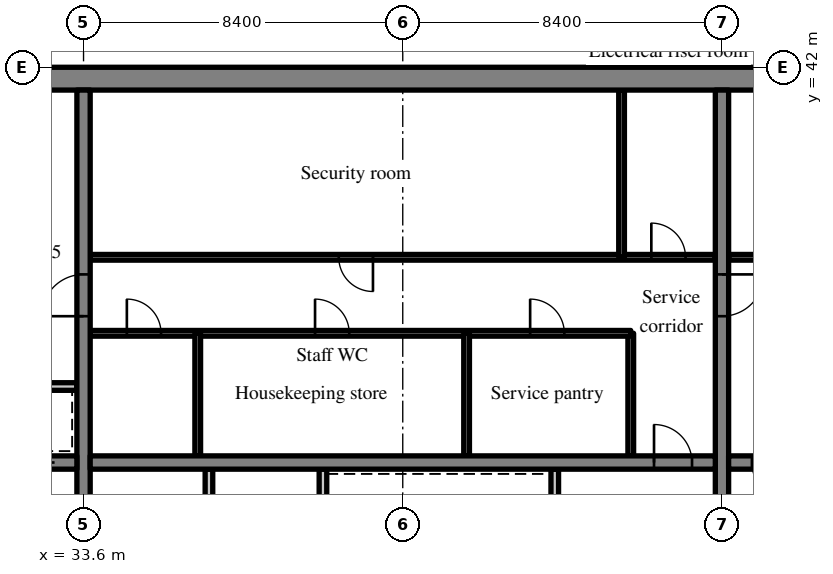
"""IFC4 building model, lengths in metres.
Left out: names, types, materials, properties, quantities, classifications, styles, units other than length and angle.
Written with IfcOpenShell. Run it as: python <this file> out.ifc"""

import sys

from ifc_helpers import new_model, si_unit, direction, frame, frame_2d, origin, place, context, subcontext, project, spatial, rectangle, extrude, source, transform, mapped, element, fill, save


model = new_model("IFC4")
c1 = context("Model", 3, precision=1e-05, world=origin(), true_north=direction((0.0, 1.0)))
c2 = subcontext(c1, "Body", "Model", "MODEL_VIEW")
j1 = project(units=[si_unit("LENGTHUNIT", "METRE"), si_unit("PLANEANGLEUNIT", "RADIAN")], contexts=[c1])
p1 = place(None, origin())
s1 = spatial("IfcSite", under=j1, at=p1, CompositionType="ELEMENT")
p2 = place(p1, origin())
s2 = spatial("IfcBuilding", under=s1, at=p2, CompositionType="ELEMENT")
p3 = place(p2, frame((0.0, 0.0, 241.3)))
s3 = spatial("IfcBuildingStorey", under=s2, at=p3, CompositionType="ELEMENT", Elevation=241.3)
m1 = source(origin(), c2, "Body", "SweptSolid", [
    extrude(rectangle(XDim=50.4, YDim=0.6, at=frame_2d((25.2, 0.0))), origin(), (0.0, 0.0, 1.0), 3.62),
])
p4 = place(p3, frame((25.2, 41.7, 0.0), z_axis=(0.0, 0.0, 1.0), x_axis=(1.0, 0.0, 0.0)))
e1 = element("IfcWall", 1, at=p4, inside=s3, PredefinedType="SHEAR", context=c2, shape_type="MappedRepresentation", body=[
    mapped(m1, transform((0.0, 0.0, 0.0), scale=1.0)),
])
m2 = source(origin(), c2, "Body", "SweptSolid", [
    extrude(rectangle(XDim=18.8, YDim=0.35, at=frame_2d((9.4, 0.0))), origin(), (0.0, 0.0, 1.0), 3.62),
])
p5 = place(p3, frame((33.6, 22.6, 0.0), z_axis=(0.0, 0.0, 1.0), x_axis=(0.0, 1.0, 0.0)))
e2 = element("IfcWall", 2, at=p5, inside=s3, PredefinedType="SHEAR", context=c2, shape_type="MappedRepresentation", body=[
    mapped(m2, transform((0.0, 0.0, 0.0), scale=1.0)),
])
m3 = source(origin(), c2, "Body", "SweptSolid", [
    extrude(rectangle(XDim=1.1, YDim=2.1, at=frame_2d((0.55, 1.05))), frame((0.0, 0.185, 0.0), z_axis=(0.0, -1.0, 0.0), x_axis=(1.0, 0.0, 0.0)), (0.0, 0.0, 1.0), 0.37),
])
p6 = place(p5, frame((12.85, 0.0, 0.0)))
e3 = element("IfcOpeningElement", 3, at=p6, cuts=e2, PredefinedType="OPENING", context=c2, shape_type="MappedRepresentation", body=[
    mapped(m3, transform((0.0, 0.0, 0.0), scale=1.0)),
])
p7 = place(p3, frame((50.4, 22.6, 0.0), z_axis=(0.0, 0.0, 1.0), x_axis=(0.0, 1.0, 0.0)))
e4 = element("IfcWall", 4, at=p7, inside=s3, PredefinedType="SHEAR", context=c2, shape_type="MappedRepresentation", body=[
    mapped(m2, transform((0.0, 0.0, 0.0), scale=1.0)),
])
p8 = place(p7, frame((12.85, 0.0, 0.0)))
e5 = element("IfcOpeningElement", 5, at=p8, cuts=e4, PredefinedType="OPENING", context=c2, shape_type="MappedRepresentation", body=[
    mapped(m3, transform((0.0, 0.0, 0.0), scale=1.0)),
])
m4 = source(origin(), c2, "Body", "SweptSolid", [
    extrude(rectangle(XDim=7.625, YDim=0.35, at=frame_2d((3.812, 0.0))), origin(), (0.0, 0.0, 1.0), 3.62),
])
p9 = place(p3, frame((25.8, 31.6, 0.0), z_axis=(0.0, 0.0, 1.0), x_axis=(1.0, 0.0, 0.0)))
e6 = element("IfcWall", 6, at=p9, inside=s3, PredefinedType="SHEAR", context=c2, shape_type="MappedRepresentation", body=[
    mapped(m4, transform((0.0, 0.0, 0.0), scale=1.0)),
])
p10 = place(p9, frame((5.938, 0.0, 0.0)))
e7 = element("IfcOpeningElement", 7, at=p10, cuts=e6, PredefinedType="OPENING", context=c2, shape_type="MappedRepresentation", body=[
    mapped(m3, transform((0.0, 0.0, 0.0), scale=1.0)),
])
m5 = source(origin(), c2, "Body", "SweptSolid", [
    extrude(rectangle(XDim=16.45, YDim=0.35, at=frame_2d((8.225, 0.0))), origin(), (0.0, 0.0, 1.0), 3.62),
])
p11 = place(p3, frame((33.775, 31.6, 0.0), z_axis=(0.0, 0.0, 1.0), x_axis=(1.0, 0.0, 0.0)))
e8 = element("IfcWall", 8, at=p11, inside=s3, PredefinedType="SHEAR", context=c2, shape_type="MappedRepresentation", body=[
    mapped(m5, transform((0.0, 0.0, 0.0), scale=1.0)),
])
m6 = source(origin(), c2, "Body", "SweptSolid", [
    extrude(rectangle(XDim=1.0, YDim=2.1, at=frame_2d((0.5, 1.05))), frame((0.0, 0.185, 0.0), z_axis=(0.0, -1.0, 0.0), x_axis=(1.0, 0.0, 0.0)), (0.0, 0.0, 1.0), 0.37),
])
p12 = place(p11, frame((14.837, 0.0, 0.0)))
e9 = element("IfcOpeningElement", 9, at=p12, cuts=e8, PredefinedType="OPENING", context=c2, shape_type="MappedRepresentation", body=[
    mapped(m6, transform((0.0, 0.0, 0.0), scale=1.0)),
])
m7 = source(origin(), c2, "Body", "SweptSolid", [
    extrude(rectangle(XDim=16.45, YDim=0.35, at=frame_2d((8.225, 0.0))), origin(), (0.0, 0.0, 1.0), 3.62),
])
p13 = place(p3, frame((50.575, 31.6, 0.0), z_axis=(0.0, 0.0, 1.0), x_axis=(1.0, 0.0, 0.0)))
e10 = element("IfcWall", 10, at=p13, inside=s3, PredefinedType="SHEAR", context=c2, shape_type="MappedRepresentation", body=[
    mapped(m7, transform((0.0, 0.0, 0.0), scale=1.0)),
])
p14 = place(p13, frame((0.613, 0.0, 0.0)))
e11 = element("IfcOpeningElement", 11, at=p14, cuts=e10, PredefinedType="OPENING", context=c2, shape_type="MappedRepresentation", body=[
    mapped(m6, transform((0.0, 0.0, 0.0), scale=1.0)),
])
m8 = source(origin(), c2, "Body", "SweptSolid", [
    extrude(rectangle(XDim=8.825, YDim=0.2, at=frame_2d((4.413, 0.0))), origin(), (0.0, 0.0, 1.0), 3.62),
])
p15 = place(p3, frame((39.9, 22.6, 0.0), z_axis=(0.0, 0.0, 1.0), x_axis=(0.0, 1.0, 0.0)))
e12 = element("IfcWall", 12, at=p15, inside=s3, PredefinedType="PARTITIONING", context=c2, shape_type="MappedRepresentation", body=[
    mapped(m8, transform((0.0, 0.0, 0.0), scale=1.0)),
])
m9 = source(origin(), c2, "Body", "SweptSolid", [
    extrude(rectangle(XDim=0.9, YDim=2.1, at=frame_2d((0.45, 1.05))), frame((0.0, 0.11, 0.0), z_axis=(0.0, -1.0, 0.0), x_axis=(1.0, 0.0, 0.0)), (0.0, 0.0, 1.0), 0.22),
])
p16 = place(p15, frame((3.15, 0.0, 0.0)))
e13 = element("IfcOpeningElement", 13, at=p16, cuts=e12, PredefinedType="OPENING", context=c2, shape_type="MappedRepresentation", body=[
    mapped(m9, transform((0.0, 0.0, 0.0), scale=1.0)),
])
p17 = place(p15, frame((4.95, 0.0, 0.0)))
e14 = element("IfcOpeningElement", 14, at=p17, cuts=e12, PredefinedType="OPENING", context=c2, shape_type="MappedRepresentation", body=[
    mapped(m9, transform((0.0, 0.0, 0.0), scale=1.0)),
])
m10 = source(origin(), c2, "Body", "SweptSolid", [
    extrude(rectangle(XDim=2.625, YDim=0.2, at=frame_2d((1.312, 0.0))), origin(), (0.0, 0.0, 1.0), 3.62),
])
p18 = place(p3, frame((46.0, 28.8, 0.0), z_axis=(0.0, 0.0, 1.0), x_axis=(0.0, 1.0, 0.0)))
e15 = element("IfcWall", 15, at=p18, inside=s3, PredefinedType="SOLIDWALL", context=c2, shape_type="MappedRepresentation", body=[
    mapped(m10, transform((0.0, 0.0, 0.0), scale=1.0)),
])
p19 = place(p3, frame((36.9, 22.6, 0.0), z_axis=(0.0, 0.0, 1.0), x_axis=(0.0, 1.0, 0.0)))
e16 = element("IfcWall", 16, at=p19, inside=s3, PredefinedType="PARTITIONING", context=c2, shape_type="MappedRepresentation", body=[
    mapped(m8, transform((0.0, 0.0, 0.0), scale=1.0)),
])
m11 = source(origin(), c2, "Body", "SweptSolid", [
    extrude(rectangle(XDim=3.225, YDim=0.15, at=frame_2d((1.613, 0.0))), origin(), (0.0, 0.0, 1.0), 3.62),
])
p20 = place(p3, frame((48.0, 31.775, 0.0), z_axis=(0.0, 0.0, 1.0), x_axis=(0.0, 1.0, 0.0)))
e17 = element("IfcWall", 17, at=p20, inside=s3, PredefinedType="PARTITIONING", context=c2, shape_type="MappedRepresentation", body=[
    mapped(m11, transform((0.0, 0.0, 0.0), scale=1.0)),
])
m12 = source(origin(), c2, "Body", "SweptSolid", [
    extrude(rectangle(XDim=14.225, YDim=0.15, at=frame_2d((7.113, 0.0))), origin(), (0.0, 0.0, 1.0), 3.62),
])
p21 = place(p3, frame((33.775, 35.0, 0.0), z_axis=(0.0, 0.0, 1.0), x_axis=(1.0, 0.0, 0.0)))
e18 = element("IfcWall", 18, at=p21, inside=s3, PredefinedType="PARTITIONING", context=c2, shape_type="MappedRepresentation", body=[
    mapped(m12, transform((0.0, 0.0, 0.0), scale=1.0)),
])
m13 = source(origin(), c2, "Body", "SweptSolid", [
    extrude(rectangle(XDim=0.9, YDim=2.1, at=frame_2d((0.45, 1.05))), frame((0.0, 0.085, 0.0), z_axis=(0.0, -1.0, 0.0), x_axis=(1.0, 0.0, 0.0)), (0.0, 0.0, 1.0), 0.17),
])
p22 = place(p21, frame((0.965, 0.0, 0.0)))
e19 = element("IfcOpeningElement", 19, at=p22, cuts=e18, PredefinedType="OPENING", context=c2, shape_type="MappedRepresentation", body=[
    mapped(m13, transform((0.0, 0.0, 0.0), scale=1.0)),
])
p23 = place(p21, frame((5.917, 0.0, 0.0)))
e20 = element("IfcOpeningElement", 20, at=p23, cuts=e18, PredefinedType="OPENING", context=c2, shape_type="MappedRepresentation", body=[
    mapped(m13, transform((0.0, 0.0, 0.0), scale=1.0)),
])
p24 = place(p21, frame((11.577, 0.0, 0.0)))
e21 = element("IfcOpeningElement", 21, at=p24, cuts=e18, PredefinedType="OPENING", context=c2, shape_type="MappedRepresentation", body=[
    mapped(m13, transform((0.0, 0.0, 0.0), scale=1.0)),
])
m14 = source(origin(), c2, "Body", "SweptSolid", [
    extrude(rectangle(XDim=16.45, YDim=0.15, at=frame_2d((8.225, 0.0))), origin(), (0.0, 0.0, 1.0), 3.62),
])
p25 = place(p3, frame((33.775, 37.0, 0.0), z_axis=(0.0, 0.0, 1.0), x_axis=(1.0, 0.0, 0.0)))
e22 = element("IfcWall", 22, at=p25, inside=s3, PredefinedType="PARTITIONING", context=c2, shape_type="MappedRepresentation", body=[
    mapped(m14, transform((0.0, 0.0, 0.0), scale=1.0)),
])
p26 = place(p25, frame((6.541, 0.0, 0.0)))
e23 = element("IfcOpeningElement", 23, at=p26, cuts=e22, PredefinedType="OPENING", context=c2, shape_type="MappedRepresentation", body=[
    mapped(m13, transform((0.0, 0.0, 0.0), scale=1.0)),
])
p27 = place(p25, frame((14.766, 0.0, 0.0)))
e24 = element("IfcOpeningElement", 24, at=p27, cuts=e22, PredefinedType="OPENING", context=c2, shape_type="MappedRepresentation", body=[
    mapped(m13, transform((0.0, 0.0, 0.0), scale=1.0)),
])
for number, where, z_axis, x_axis in (
    (25, (36.605, 31.775, 0.0), (0.0, 0.0, 1.0), (0.0, 1.0, 0.0)),
    (26, (43.68, 31.775, 0.0), (0.0, 0.0, 1.0), (0.0, 1.0, 0.0)),
):
    element("IfcWall", number, at=place(p3, frame(where, z_axis=z_axis, x_axis=x_axis)), inside=s3, PredefinedType="PARTITIONING", context=c2, shape_type="MappedRepresentation", body=[
        mapped(m11, transform((0.0, 0.0, 0.0), scale=1.0)),
    ])
m15 = source(origin(), c2, "Body", "SweptSolid", [
    extrude(rectangle(XDim=4.4, YDim=0.15, at=frame_2d((2.2, 0.0))), origin(), (0.0, 0.0, 1.0), 3.62),
])
p28 = place(p3, frame((47.758, 37.0, 0.0), z_axis=(0.0, 0.0, 1.0), x_axis=(0.0, 1.0, 0.0)))
e27 = element("IfcWall", 27, at=p28, inside=s3, PredefinedType="PARTITIONING", context=c2, shape_type="MappedRepresentation", body=[
    mapped(m15, transform((0.0, 0.0, 0.0), scale=1.0)),
])
m16 = source(origin(), c2, "Body", "SweptSolid", [
    extrude(rectangle(XDim=16.45, YDim=0.15, at=frame_2d((8.225, 0.0))), origin(), (0.0, 0.0, 1.0), 3.62),
])
p29 = place(p3, frame((67.025, 37.0, 0.0), z_axis=(0.0, 0.0, 1.0), x_axis=(-1.0, 0.0, 0.0)))
e28 = element("IfcWall", 28, at=p29, inside=s3, PredefinedType="PARTITIONING", context=c2, shape_type="MappedRepresentation", body=[
    mapped(m16, transform((0.0, 0.0, 0.0), scale=1.0)),
])
p30 = place(p29, frame((1.606, 0.0, 0.0)))
e29 = element("IfcOpeningElement", 29, at=p30, cuts=e28, PredefinedType="OPENING", context=c2, shape_type="MappedRepresentation", body=[
    mapped(m13, transform((0.0, 0.0, 0.0), scale=1.0)),
])
p31 = place(p29, frame((7.364, 0.0, 0.0)))
e30 = element("IfcOpeningElement", 30, at=p31, cuts=e28, PredefinedType="OPENING", context=c2, shape_type="MappedRepresentation", body=[
    mapped(m13, transform((0.0, 0.0, 0.0), scale=1.0)),
])
p32 = place(p29, frame((12.299, 0.0, 0.0)))
e31 = element("IfcOpeningElement", 31, at=p32, cuts=e28, PredefinedType="OPENING", context=c2, shape_type="MappedRepresentation", body=[
    mapped(m13, transform((0.0, 0.0, 0.0), scale=1.0)),
])
p33 = place(p29, frame((14.766, 0.0, 0.0)))
e32 = element("IfcOpeningElement", 32, at=p33, cuts=e28, PredefinedType="OPENING", context=c2, shape_type="MappedRepresentation", body=[
    mapped(m13, transform((0.0, 0.0, 0.0), scale=1.0)),
])
m17 = source(origin(), c2, "Body", "SweptSolid", [
    extrude(rectangle(XDim=2.275, YDim=0.2, at=frame_2d((1.138, 0.0))), origin(), (0.0, 0.0, 1.0), 3.62),
])
p34 = place(p3, frame((31.15, 33.6, 0.0), z_axis=(0.0, 0.0, 1.0), x_axis=(1.0, 0.0, 0.0)))
e33 = element("IfcWall", 33, at=p34, inside=s3, PredefinedType="SOLIDWALL", context=c2, shape_type="MappedRepresentation", body=[
    mapped(m17, transform((0.0, 0.0, 0.0), scale=1.0)),
])
m18 = source(origin(), c2, "Body", "SweptSolid", [
    extrude(rectangle(XDim=1.0, YDim=2.1, at=frame_2d((0.5, 1.05))), frame((0.0, 0.025, 0.0), z_axis=(0.0, -1.0, 0.0), x_axis=(1.0, 0.0, 0.0)), (0.0, 0.0, 1.0), 0.05),
])
p35 = place(p12, origin())
e34 = element("IfcDoor", 34, at=p35, inside=s3, OperationType="SINGLE_SWING_LEFT", PredefinedType="DOOR", context=c2, shape_type="MappedRepresentation", body=[
    mapped(m18, transform((0.0, 0.0, 0.0), scale=1.0)),
])
fill(e9, e34)
m19 = source(origin(), c2, "Body", "SweptSolid", [
    extrude(rectangle(XDim=0.9, YDim=2.1, at=frame_2d((0.45, 1.05))), frame((0.0, 0.025, 0.0), z_axis=(0.0, -1.0, 0.0), x_axis=(1.0, 0.0, 0.0)), (0.0, 0.0, 1.0), 0.05),
])
p36 = place(p22, origin())
e35 = element("IfcDoor", 35, at=p36, inside=s3, OperationType="SINGLE_SWING_LEFT", PredefinedType="DOOR", context=c2, shape_type="MappedRepresentation", body=[
    mapped(m19, transform((0.0, 0.0, 0.0), scale=1.0)),
])
fill(e19, e35)
p37 = place(p23, origin())
e36 = element("IfcDoor", 36, at=p37, inside=s3, OperationType="SINGLE_SWING_LEFT", PredefinedType="DOOR", context=c2, shape_type="MappedRepresentation", body=[
    mapped(m19, transform((0.0, 0.0, 0.0), scale=1.0)),
])
fill(e20, e36)
p38 = place(p24, origin())
e37 = element("IfcDoor", 37, at=p38, inside=s3, OperationType="SINGLE_SWING_LEFT", PredefinedType="DOOR", context=c2, shape_type="MappedRepresentation", body=[
    mapped(m19, transform((0.0, 0.0, 0.0), scale=1.0)),
])
fill(e21, e37)
p39 = place(p26, origin())
e38 = element("IfcDoor", 38, at=p39, inside=s3, OperationType="SINGLE_SWING_RIGHT", PredefinedType="DOOR", context=c2, shape_type="MappedRepresentation", body=[
    mapped(m19, transform((0.0, 0.0, 0.0), scale=1.0)),
])
fill(e23, e38)
p40 = place(p27, origin())
e39 = element("IfcDoor", 39, at=p40, inside=s3, OperationType="SINGLE_SWING_LEFT", PredefinedType="DOOR", context=c2, shape_type="MappedRepresentation", body=[
    mapped(m19, transform((0.0, 0.0, 0.0), scale=1.0)),
])
fill(e24, e39)
p41 = place(p14, origin())
e40 = element("IfcDoor", 40, at=p41, inside=s3, OperationType="SINGLE_SWING_RIGHT", PredefinedType="DOOR", context=c2, shape_type="MappedRepresentation", body=[
    mapped(m18, transform((0.0, 0.0, 0.0), scale=1.0)),
])
fill(e11, e40)
m20 = source(origin(), c2, "Body", "SweptSolid", [
    extrude(rectangle(XDim=1.1, YDim=2.1, at=frame_2d((0.55, 1.05))), frame((0.0, 0.025, 0.0), z_axis=(0.0, -1.0, 0.0), x_axis=(1.0, 0.0, 0.0)), (0.0, 0.0, 1.0), 0.05),
])
p42 = place(p10, origin())
e41 = element("IfcDoor", 41, at=p42, inside=s3, OperationType="SLIDING_TO_RIGHT", PredefinedType="DOOR", context=c2, shape_type="MappedRepresentation", body=[
    mapped(m20, transform((0.0, 0.0, 0.0), scale=1.0)),
])
fill(e7, e41)
p43 = place(p6, origin())
e42 = element("IfcDoor", 42, at=p43, inside=s3, OperationType="SINGLE_SWING_LEFT", PredefinedType="DOOR", context=c2, shape_type="MappedRepresentation", body=[
    mapped(m20, transform((0.0, 0.0, 0.0), scale=1.0)),
])
fill(e3, e42)
p44 = place(p8, origin())
e43 = element("IfcDoor", 43, at=p44, inside=s3, OperationType="SINGLE_SWING_RIGHT", PredefinedType="DOOR", context=c2, shape_type="MappedRepresentation", body=[
    mapped(m20, transform((0.0, 0.0, 0.0), scale=1.0)),
])
fill(e5, e43)
save(model, sys.argv[1])
